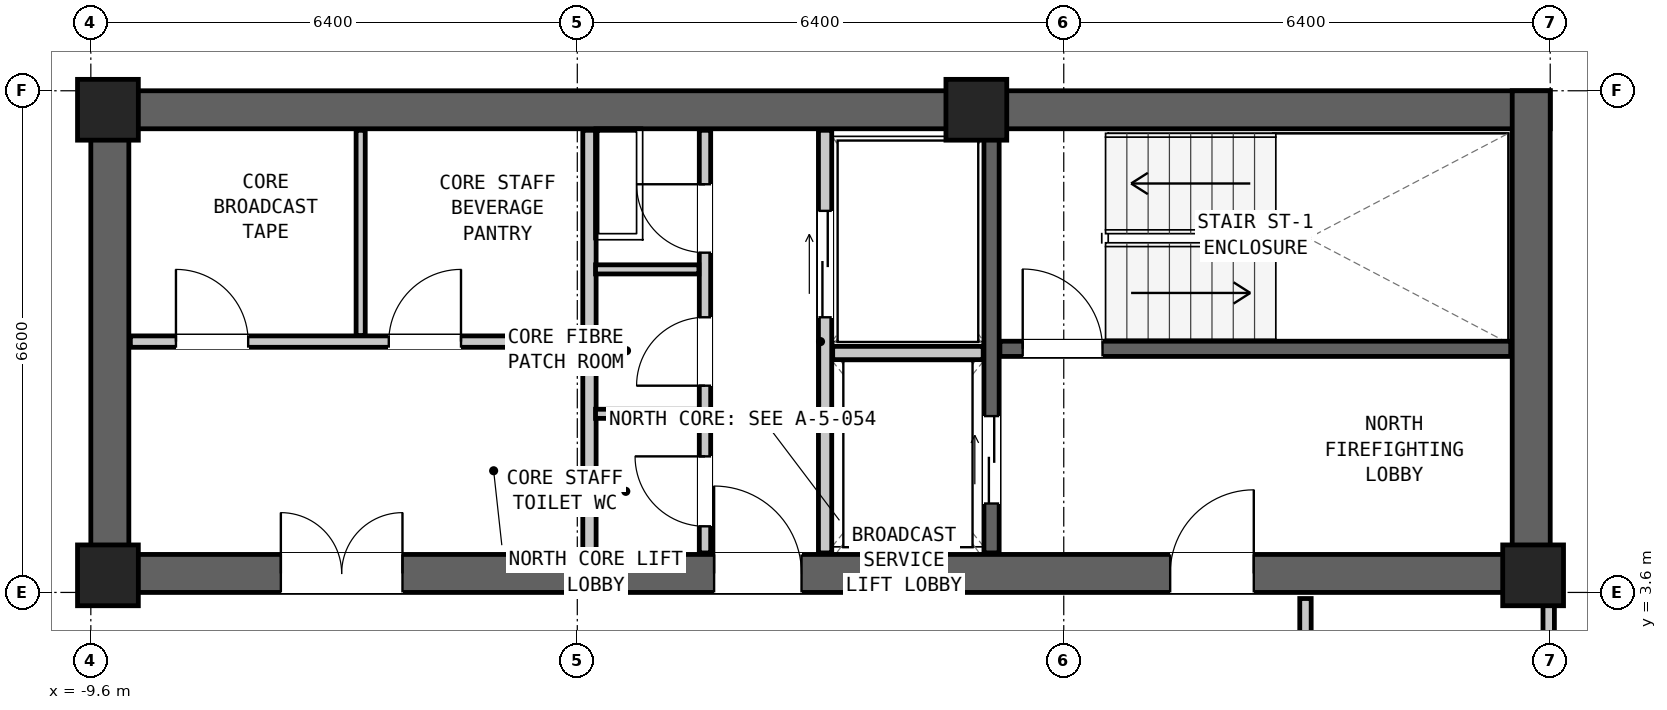
"""IFC4 building model, lengths in metres.
Left out: names, types, materials, properties, quantities, classifications, styles, units other than length and angle.
Written with IfcOpenShell. Run it as: python <this file> out.ifc"""

import sys

from ifc_helpers import new_model, si_unit, direction, frame, frame_2d, origin, origin_2d, place, context, subcontext, project, spatial, rectangle, extrude, element, fill, save


model = new_model("IFC4")
c1 = context("Model", 3, precision=1e-05, world=origin(), true_north=direction((0.0, 1.0)))
c2 = subcontext(c1, "Body", "Model", "MODEL_VIEW")
j1 = project(units=[si_unit("LENGTHUNIT", "METRE"), si_unit("PLANEANGLEUNIT", "RADIAN")], contexts=[c1])
p1 = place(None, origin())
s1 = spatial("IfcSite", under=j1, at=p1, CompositionType="ELEMENT")
p2 = place(p1, origin())
s2 = spatial("IfcBuilding", under=s1, at=p2, CompositionType="ELEMENT")
p3 = place(p2, frame((0.0, 0.0, 174.45)))
s3 = spatial("IfcBuildingStorey", under=s2, at=p3, CompositionType="ELEMENT", Elevation=174.45)
p4 = place(p3, frame((-9.6, 9.95, 0.0), z_axis=(0.0, 0.0, 1.0), x_axis=(1.0, 0.0, 0.0)))
e1 = element("IfcWall", 1, at=p4, inside=s3, PredefinedType="SHEAR", context=c2, shape_type="SweptSolid", body=[
    extrude(rectangle(XDim=19.2, YDim=0.5, at=frame_2d((9.6, 0.0))), origin(), (0.0, 0.0, 1.0), 3.05),
])
p5 = place(p3, frame((-9.6, 3.85, 0.0), z_axis=(0.0, 0.0, 1.0), x_axis=(1.0, 0.0, 0.0)))
e2 = element("IfcWall", 2, at=p5, inside=s3, PredefinedType="SHEAR", context=c2, shape_type="SweptSolid", body=[
    extrude(rectangle(XDim=19.2, YDim=0.5, at=frame_2d((9.6, 0.0))), origin(), (0.0, 0.0, 1.0), 3.05),
])
p6 = place(p5, frame((14.2, 0.0, 0.0)))
e3 = element("IfcOpeningElement", 3, at=p6, cuts=e2, PredefinedType="OPENING", context=c2, shape_type="SweptSolid", body=[
    extrude(rectangle(XDim=1.1, YDim=2.08, at=frame_2d((0.55, 1.04))), frame((0.0, 0.262, 0.0), z_axis=(0.0, -1.0, 0.0), x_axis=(1.0, 0.0, 0.0)), (0.0, 0.0, 1.0), 0.524),
])
p7 = place(p5, frame((8.2, 0.0, 0.0)))
e4 = element("IfcOpeningElement", 4, at=p7, cuts=e2, PredefinedType="OPENING", context=c2, shape_type="SweptSolid", body=[
    extrude(rectangle(XDim=1.15, YDim=2.1, at=frame_2d((0.575, 1.05))), frame((0.0, 0.262, 0.0), z_axis=(0.0, -1.0, 0.0), x_axis=(1.0, 0.0, 0.0)), (0.0, 0.0, 1.0), 0.524),
])
p8 = place(p5, frame((2.5, 0.0, 0.0)))
e5 = element("IfcOpeningElement", 5, at=p8, cuts=e2, PredefinedType="OPENING", context=c2, shape_type="SweptSolid", body=[
    extrude(rectangle(XDim=1.6, YDim=2.12, at=frame_2d((0.8, 1.06))), frame((0.0, 0.262, 0.0), z_axis=(0.0, -1.0, 0.0), x_axis=(1.0, 0.0, 0.0)), (0.0, 0.0, 1.0), 0.524),
])
for number, where, z_axis, x_axis in (
    (6, (-9.35, 3.6, 0.0), (0.0, 0.0, 1.0), (0.0, 1.0, 0.0)),
    (7, (9.35, 3.6, 0.0), (0.0, 0.0, 1.0), (0.0, 1.0, 0.0)),
):
    element("IfcWall", number, at=place(p3, frame(where, z_axis=z_axis, x_axis=x_axis)), inside=s3, PredefinedType="SHEAR", context=c2, shape_type="SweptSolid", body=[
        extrude(rectangle(XDim=6.6, YDim=0.5, at=frame_2d((3.3, 0.0))), origin(), (0.0, 0.0, 1.0), 3.05),
    ])
for number, where, z_axis, x_axis in (
    (8, (-9.375, 9.95, 0.0), (0.0, 0.0, 1.0), (1.0, 0.0, 0.0)),
    (9, (2.05, 9.95, 0.0), (0.0, 0.0, 1.0), (1.0, 0.0, 0.0)),
    (10, (-9.375, 3.825, 0.0), (0.0, 0.0, 1.0), (1.0, 0.0, 0.0)),
    (11, (9.375, 3.825, 0.0), (0.0, 0.0, 1.0), (1.0, 0.0, 0.0)),
):
    element("IfcColumn", number, at=place(p3, frame(where, z_axis=z_axis, x_axis=x_axis)), inside=s3, PredefinedType="COLUMN", context=c2, shape_type="SweptSolid", body=[
        extrude(rectangle(XDim=0.8, YDim=0.8, at=origin_2d()), origin(), (0.0, 0.0, 1.0), 3.05),
    ])
p9 = place(p3, frame((2.36, 6.805, 0.0), z_axis=(0.0, 0.0, 1.0), x_axis=(1.0, 0.0, 0.0)))
e12 = element("IfcWall", 12, at=p9, inside=s3, PredefinedType="SHEAR", context=c2, shape_type="SweptSolid", body=[
    extrude(rectangle(XDim=6.72, YDim=0.2, at=frame_2d((3.36, 0.0))), origin(), (0.0, 0.0, 1.0), 2.83),
])
p10 = place(p9, frame((0.3, 0.0, 0.0)))
e13 = element("IfcOpeningElement", 13, at=p10, cuts=e12, PredefinedType="OPENING", context=c2, shape_type="SweptSolid", body=[
    extrude(rectangle(XDim=1.05, YDim=2.08, at=frame_2d((0.525, 1.04))), frame((0.0, 0.112, 0.0), z_axis=(0.0, -1.0, 0.0), x_axis=(1.0, 0.0, 0.0)), (0.0, 0.0, 1.0), 0.224),
])
p11 = place(p3, frame((2.25, 4.12, 0.0), z_axis=(0.0, 0.0, 1.0), x_axis=(0.0, 1.0, 0.0)))
e14 = element("IfcWall", 14, at=p11, inside=s3, PredefinedType="SHEAR", context=c2, shape_type="SweptSolid", body=[
    extrude(rectangle(XDim=5.56, YDim=0.2, at=frame_2d((2.78, 0.0))), origin(), (0.0, 0.0, 1.0), 2.83),
])
p12 = place(p11, frame((0.65, 0.0, 0.0)))
e15 = element("IfcOpeningElement", 15, at=p12, cuts=e14, PredefinedType="OPENING", context=c2, shape_type="SweptSolid", body=[
    extrude(rectangle(XDim=1.15, YDim=2.08, at=frame_2d((0.575, 1.04))), frame((0.0, 0.112, 0.0), z_axis=(0.0, -1.0, 0.0), x_axis=(1.0, 0.0, 0.0)), (0.0, 0.0, 1.0), 0.224),
])
p13 = place(p3, frame((0.06, 4.12, 0.0), z_axis=(0.0, 0.0, 1.0), x_axis=(0.0, 1.0, 0.0)))
e16 = element("IfcWall", 16, at=p13, inside=s3, PredefinedType="PARTITIONING", context=c2, shape_type="SweptSolid", body=[
    extrude(rectangle(XDim=5.56, YDim=0.175, at=frame_2d((2.78, 0.0))), origin(), (0.0, 0.0, 1.0), 2.83),
])
p14 = place(p13, frame((3.1, 0.0, 0.0)))
e17 = element("IfcOpeningElement", 17, at=p14, cuts=e16, PredefinedType="OPENING", context=c2, shape_type="SweptSolid", body=[
    extrude(rectangle(XDim=1.4, YDim=2.12, at=frame_2d((0.7, 1.06))), frame((0.0, 0.1, 0.0), z_axis=(0.0, -1.0, 0.0), x_axis=(1.0, 0.0, 0.0)), (0.0, 0.0, 1.0), 0.199),
])
p15 = place(p3, frame((0.16, 6.75, 0.0), z_axis=(0.0, 0.0, 1.0), x_axis=(1.0, 0.0, 0.0)))
e18 = element("IfcWall", 18, at=p15, inside=s3, PredefinedType="PARTITIONING", context=c2, shape_type="SweptSolid", body=[
    extrude(rectangle(XDim=1.98, YDim=0.175, at=frame_2d((0.99, 0.0))), origin(), (0.0, 0.0, 1.0), 2.83),
])
p16 = place(p3, frame((-3.04, 4.12, 0.0), z_axis=(0.0, 0.0, 1.0), x_axis=(0.0, 1.0, 0.0)))
e19 = element("IfcWall", 19, at=p16, inside=s3, PredefinedType="PARTITIONING", context=c2, shape_type="SweptSolid", body=[
    extrude(rectangle(XDim=5.56, YDim=0.175, at=frame_2d((2.78, 0.0))), origin(), (0.0, 0.0, 1.0), 2.83),
])
p17 = place(p3, frame((-1.52, 4.12, 0.0), z_axis=(0.0, 0.0, 1.0), x_axis=(0.0, 1.0, 0.0)))
e20 = element("IfcWall", 20, at=p17, inside=s3, PredefinedType="PARTITIONING", context=c2, shape_type="SweptSolid", body=[
    extrude(rectangle(XDim=5.56, YDim=0.15, at=frame_2d((2.78, 0.0))), origin(), (0.0, 0.0, 1.0), 2.83),
])
p18 = place(p17, frame((3.95, 0.0, 0.0)))
e21 = element("IfcOpeningElement", 21, at=p18, cuts=e20, PredefinedType="OPENING", context=c2, shape_type="SweptSolid", body=[
    extrude(rectangle(XDim=0.9, YDim=2.05, at=frame_2d((0.45, 1.025))), frame((0.0, 0.087, 0.0), z_axis=(0.0, -1.0, 0.0), x_axis=(1.0, 0.0, 0.0)), (0.0, 0.0, 1.0), 0.174),
])
p19 = place(p17, frame((2.2, 0.0, 0.0)))
e22 = element("IfcOpeningElement", 22, at=p19, cuts=e20, PredefinedType="OPENING", context=c2, shape_type="SweptSolid", body=[
    extrude(rectangle(XDim=0.9, YDim=2.05, at=frame_2d((0.45, 1.025))), frame((0.0, 0.087, 0.0), z_axis=(0.0, -1.0, 0.0), x_axis=(1.0, 0.0, 0.0)), (0.0, 0.0, 1.0), 0.174),
])
p20 = place(p17, frame((0.35, 0.0, 0.0)))
e23 = element("IfcOpeningElement", 23, at=p20, cuts=e20, PredefinedType="OPENING", context=c2, shape_type="SweptSolid", body=[
    extrude(rectangle(XDim=0.92, YDim=2.1, at=frame_2d((0.46, 1.05))), frame((0.0, 0.087, 0.0), z_axis=(0.0, -1.0, 0.0), x_axis=(1.0, 0.0, 0.0)), (0.0, 0.0, 1.0), 0.174),
])
for number, where, z_axis, x_axis in (
    (24, (-2.96, 5.95, 0.0), (0.0, 0.0, 1.0), (1.0, 0.0, 0.0)),
    (25, (-2.96, 7.85, 0.0), (0.0, 0.0, 1.0), (1.0, 0.0, 0.0)),
):
    element("IfcWall", number, at=place(p3, frame(where, z_axis=z_axis, x_axis=x_axis)), inside=s3, PredefinedType="PARTITIONING", context=c2, shape_type="SweptSolid", body=[
        extrude(rectangle(XDim=1.36, YDim=0.12, at=frame_2d((0.68, 0.0))), origin(), (0.0, 0.0, 1.0), 2.83),
    ])
p21 = place(p3, frame((-9.08, 6.9, 0.0), z_axis=(0.0, 0.0, 1.0), x_axis=(1.0, 0.0, 0.0)))
e26 = element("IfcWall", 26, at=p21, inside=s3, PredefinedType="PARTITIONING", context=c2, shape_type="SweptSolid", body=[
    extrude(rectangle(XDim=5.96, YDim=0.15, at=frame_2d((2.98, 0.0))), origin(), (0.0, 0.0, 1.0), 2.83),
])
p22 = place(p21, frame((0.6, 0.0, 0.0)))
e27 = element("IfcOpeningElement", 27, at=p22, cuts=e26, PredefinedType="OPENING", context=c2, shape_type="SweptSolid", body=[
    extrude(rectangle(XDim=0.95, YDim=2.1, at=frame_2d((0.475, 1.05))), frame((0.0, 0.087, 0.0), z_axis=(0.0, -1.0, 0.0), x_axis=(1.0, 0.0, 0.0)), (0.0, 0.0, 1.0), 0.174),
])
p23 = place(p21, frame((3.4, 0.0, 0.0)))
e28 = element("IfcOpeningElement", 28, at=p23, cuts=e26, PredefinedType="OPENING", context=c2, shape_type="SweptSolid", body=[
    extrude(rectangle(XDim=0.95, YDim=2.1, at=frame_2d((0.475, 1.05))), frame((0.0, 0.087, 0.0), z_axis=(0.0, -1.0, 0.0), x_axis=(1.0, 0.0, 0.0)), (0.0, 0.0, 1.0), 0.174),
])
p24 = place(p3, frame((-6.05, 6.98, 0.0), z_axis=(0.0, 0.0, 1.0), x_axis=(0.0, 1.0, 0.0)))
e29 = element("IfcWall", 29, at=p24, inside=s3, PredefinedType="PARTITIONING", context=c2, shape_type="SweptSolid", body=[
    extrude(rectangle(XDim=2.7, YDim=0.12, at=frame_2d((1.35, 0.0))), origin(), (0.0, 0.0, 1.0), 2.83),
])
p25 = place(p3, frame((6.38, -2.32, 0.0), z_axis=(0.0, 0.0, 1.0), x_axis=(0.0, 1.0, 0.0)))
e30 = element("IfcWall", 30, at=p25, inside=s3, PredefinedType="PARTITIONING", context=c2, shape_type="SweptSolid", body=[
    extrude(rectangle(XDim=5.84, YDim=0.15, at=frame_2d((2.92, 0.0))), origin(), (0.0, 0.0, 1.0), 2.198),
])
p26 = place(p3, frame((9.58, -2.32, 0.0), z_axis=(0.0, 0.0, 1.0), x_axis=(0.0, 1.0, 0.0)))
e31 = element("IfcWall", 31, at=p26, inside=s3, PredefinedType="PARTITIONING", context=c2, shape_type="SweptSolid", body=[
    extrude(rectangle(XDim=5.84, YDim=0.15, at=frame_2d((2.92, 0.0))), origin(), (0.0, 0.0, 1.0), 2.198),
])
p27 = place(p26, frame((2.445, 0.0, 0.0)))
e32 = element("IfcOpeningElement", 32, at=p27, cuts=e31, PredefinedType="OPENING", context=c2, shape_type="SweptSolid", body=[
    extrude(rectangle(XDim=0.95, YDim=2.1, at=frame_2d((0.475, 1.05))), frame((0.0, 0.087, 0.0), z_axis=(0.0, -1.0, 0.0), x_axis=(1.0, 0.0, 0.0)), (0.0, 0.0, 1.0), 0.174),
])
p28 = place(p10, origin())
e33 = element("IfcDoor", 33, at=p28, inside=s3, OperationType="SINGLE_SWING_LEFT", PredefinedType="DOOR", context=c2, shape_type="SweptSolid", body=[
    extrude(rectangle(XDim=1.05, YDim=2.08, at=frame_2d((0.525, 1.04))), frame((0.0, 0.025, 0.0), z_axis=(0.0, -1.0, 0.0), x_axis=(1.0, 0.0, 0.0)), (0.0, 0.0, 1.0), 0.05),
])
fill(e13, e33)
p29 = place(p6, origin())
e34 = element("IfcDoor", 34, at=p29, inside=s3, OperationType="SINGLE_SWING_RIGHT", PredefinedType="DOOR", context=c2, shape_type="SweptSolid", body=[
    extrude(rectangle(XDim=1.1, YDim=2.08, at=frame_2d((0.55, 1.04))), frame((0.0, 0.025, 0.0), z_axis=(0.0, -1.0, 0.0), x_axis=(1.0, 0.0, 0.0)), (0.0, 0.0, 1.0), 0.05),
])
fill(e3, e34)
p30 = place(p12, origin())
e35 = element("IfcDoor", 35, at=p30, inside=s3, OperationType="DOUBLE_DOOR_SLIDING", PredefinedType="DOOR", context=c2, shape_type="SweptSolid", body=[
    extrude(rectangle(XDim=1.15, YDim=2.08, at=frame_2d((0.575, 1.04))), frame((0.0, 0.025, 0.0), z_axis=(0.0, -1.0, 0.0), x_axis=(1.0, 0.0, 0.0)), (0.0, 0.0, 1.0), 0.05),
])
fill(e15, e35)
p31 = place(p14, origin())
e36 = element("IfcDoor", 36, at=p31, inside=s3, OperationType="DOUBLE_DOOR_SLIDING", PredefinedType="DOOR", context=c2, shape_type="SweptSolid", body=[
    extrude(rectangle(XDim=1.4, YDim=2.12, at=frame_2d((0.7, 1.06))), frame((0.0, 0.025, 0.0), z_axis=(0.0, -1.0, 0.0), x_axis=(1.0, 0.0, 0.0)), (0.0, 0.0, 1.0), 0.05),
])
fill(e17, e36)
p32 = place(p7, origin())
e37 = element("IfcDoor", 37, at=p32, inside=s3, OperationType="SINGLE_SWING_LEFT", PredefinedType="DOOR", context=c2, shape_type="SweptSolid", body=[
    extrude(rectangle(XDim=1.15, YDim=2.1, at=frame_2d((0.575, 1.05))), frame((0.0, 0.025, 0.0), z_axis=(0.0, -1.0, 0.0), x_axis=(1.0, 0.0, 0.0)), (0.0, 0.0, 1.0), 0.05),
])
fill(e4, e37)
p33 = place(p18, origin())
e38 = element("IfcDoor", 38, at=p33, inside=s3, OperationType="SINGLE_SWING_RIGHT", PredefinedType="DOOR", context=c2, shape_type="SweptSolid", body=[
    extrude(rectangle(XDim=0.9, YDim=2.05, at=frame_2d((0.45, 1.025))), frame((0.0, 0.025, 0.0), z_axis=(0.0, -1.0, 0.0), x_axis=(1.0, 0.0, 0.0)), (0.0, 0.0, 1.0), 0.05),
])
fill(e21, e38)
p34 = place(p19, origin())
e39 = element("IfcDoor", 39, at=p34, inside=s3, OperationType="SINGLE_SWING_LEFT", PredefinedType="DOOR", context=c2, shape_type="SweptSolid", body=[
    extrude(rectangle(XDim=0.9, YDim=2.05, at=frame_2d((0.45, 1.025))), frame((0.0, 0.025, 0.0), z_axis=(0.0, -1.0, 0.0), x_axis=(1.0, 0.0, 0.0)), (0.0, 0.0, 1.0), 0.05),
])
fill(e22, e39)
p35 = place(p20, origin())
e40 = element("IfcDoor", 40, at=p35, inside=s3, OperationType="SINGLE_SWING_RIGHT", PredefinedType="DOOR", context=c2, shape_type="SweptSolid", body=[
    extrude(rectangle(XDim=0.92, YDim=2.1, at=frame_2d((0.46, 1.05))), frame((0.0, 0.025, 0.0), z_axis=(0.0, -1.0, 0.0), x_axis=(1.0, 0.0, 0.0)), (0.0, 0.0, 1.0), 0.05),
])
fill(e23, e40)
p36 = place(p8, origin())
e41 = element("IfcDoor", 41, at=p36, inside=s3, OperationType="DOUBLE_DOOR_SINGLE_SWING", PredefinedType="DOOR", context=c2, shape_type="SweptSolid", body=[
    extrude(rectangle(XDim=1.6, YDim=2.12, at=frame_2d((0.8, 1.06))), frame((0.0, 0.025, 0.0), z_axis=(0.0, -1.0, 0.0), x_axis=(1.0, 0.0, 0.0)), (0.0, 0.0, 1.0), 0.05),
])
fill(e5, e41)
p37 = place(p22, origin())
e42 = element("IfcDoor", 42, at=p37, inside=s3, OperationType="SINGLE_SWING_LEFT", PredefinedType="DOOR", context=c2, shape_type="SweptSolid", body=[
    extrude(rectangle(XDim=0.95, YDim=2.1, at=frame_2d((0.475, 1.05))), frame((0.0, 0.025, 0.0), z_axis=(0.0, -1.0, 0.0), x_axis=(1.0, 0.0, 0.0)), (0.0, 0.0, 1.0), 0.05),
])
fill(e27, e42)
p38 = place(p23, origin())
e43 = element("IfcDoor", 43, at=p38, inside=s3, OperationType="SINGLE_SWING_RIGHT", PredefinedType="DOOR", context=c2, shape_type="SweptSolid", body=[
    extrude(rectangle(XDim=0.95, YDim=2.1, at=frame_2d((0.475, 1.05))), frame((0.0, 0.025, 0.0), z_axis=(0.0, -1.0, 0.0), x_axis=(1.0, 0.0, 0.0)), (0.0, 0.0, 1.0), 0.05),
])
fill(e28, e43)
save(model, sys.argv[1])
